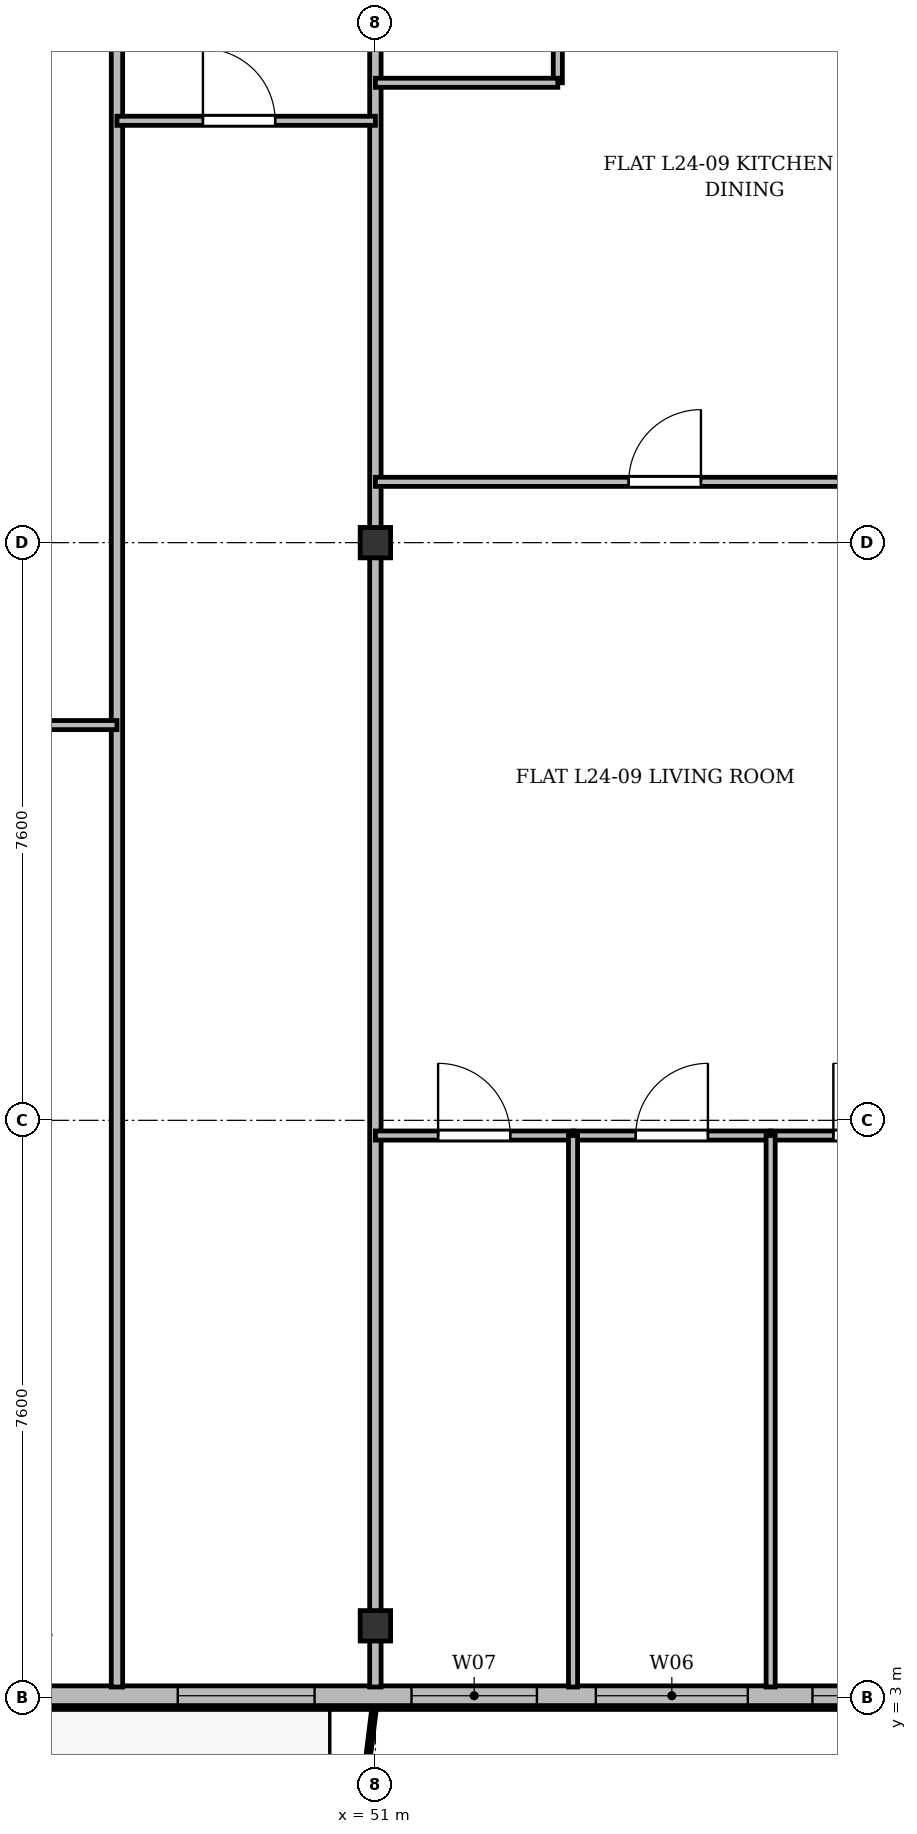
"""IFC4 building model, lengths in metres.
Left out: names, types, materials, properties, quantities, classifications, styles, units other than length and angle.
Written with IfcOpenShell. Run it as: python <this file> out.ifc"""

import sys

from ifc_helpers import new_model, si_unit, direction, frame, frame_2d, origin, origin_2d, place, context, subcontext, project, spatial, rectangle, i_section, extrude, source, transform, mapped, element, fill, save


model = new_model("IFC4")
c1 = context("Model", 3, precision=1e-05, world=origin(), true_north=direction((0.0, 1.0)))
c2 = subcontext(c1, "Body", "Model", "MODEL_VIEW")
j1 = project(units=[si_unit("LENGTHUNIT", "METRE"), si_unit("PLANEANGLEUNIT", "RADIAN")], contexts=[c1])
p1 = place(None, origin())
s1 = spatial("IfcSite", under=j1, at=p1, CompositionType="ELEMENT")
p2 = place(p1, origin())
s2 = spatial("IfcBuilding", under=s1, at=p2, CompositionType="ELEMENT")
p3 = place(p2, frame((0.0, 0.0, 96.1)))
s3 = spatial("IfcBuildingStorey", under=s2, at=p3, CompositionType="ELEMENT", Elevation=96.1)
m1 = source(origin(), c2, "Body", "SweptSolid", [
    extrude(i_section(OverallWidth=0.4, OverallDepth=0.4, WebThickness=0.022, FlangeThickness=0.035, at=origin_2d()), origin(), (0.0, 0.0, 1.0), 3.6),
])
for number, where, z_axis, x_axis in (
    (1, (51.0, 3.95, 0.0), (0.0, 0.0, 1.0), (1.0, 0.0, 0.0)),
    (2, (51.0, 18.2, 0.0), (0.0, 0.0, 1.0), (1.0, 0.0, 0.0)),
):
    element("IfcColumn", number, at=place(p3, frame(where, z_axis=z_axis, x_axis=x_axis)), inside=s3, PredefinedType="COLUMN", context=c2, shape_type="MappedRepresentation", body=[
        mapped(m1, transform((0.0, 0.0, 0.0), x_axis=(1.0, 0.0, 0.0), y_axis=(0.0, 1.0, 0.0), z_axis=(0.0, 0.0, 1.0), scale=1.0)),
    ])
p4 = place(p3, frame((66.9, 3.03, 0.0), z_axis=(0.0, 0.0, 1.0), x_axis=(-1.0, 0.0, 0.0)))
e3 = element("IfcWall", 3, at=p4, inside=s3, PredefinedType="SOLIDWALL", context=c2, shape_type="SweptSolid", body=[
    extrude(rectangle(XDim=59.4, YDim=0.26, at=frame_2d((29.7, 0.0))), origin(), (0.0, 0.0, 1.0), 3.34),
])
p5 = place(p4, frame((2.1, 0.0, 0.9)))
e4 = element("IfcOpeningElement", 4, at=p5, cuts=e3, PredefinedType="OPENING", context=c2, shape_type="SweptSolid", body=[
    extrude(rectangle(XDim=1.8, YDim=1.8, at=frame_2d((0.9, 0.9))), frame((0.0, 0.14, 0.0), z_axis=(0.0, -1.0, 0.0), x_axis=(1.0, 0.0, 0.0)), (0.0, 0.0, 1.0), 0.28),
])
p6 = place(p4, frame((5.3, 0.0, 0.9)))
e5 = element("IfcOpeningElement", 5, at=p6, cuts=e3, PredefinedType="OPENING", context=c2, shape_type="SweptSolid", body=[
    extrude(rectangle(XDim=2.2, YDim=1.8, at=frame_2d((1.1, 0.9))), frame((0.0, 0.14, 0.0), z_axis=(0.0, -1.0, 0.0), x_axis=(1.0, 0.0, 0.0)), (0.0, 0.0, 1.0), 0.28),
])
p7 = place(p4, frame((8.65, 0.0, 0.9)))
e6 = element("IfcOpeningElement", 6, at=p7, cuts=e3, PredefinedType="OPENING", context=c2, shape_type="SweptSolid", body=[
    extrude(rectangle(XDim=1.5, YDim=1.75, at=frame_2d((0.75, 0.875))), frame((0.0, 0.14, 0.0), z_axis=(0.0, -1.0, 0.0), x_axis=(1.0, 0.0, 0.0)), (0.0, 0.0, 1.0), 0.28),
])
p8 = place(p4, frame((11.0, 0.0, 0.9)))
e7 = element("IfcOpeningElement", 7, at=p8, cuts=e3, PredefinedType="OPENING", context=c2, shape_type="SweptSolid", body=[
    extrude(rectangle(XDim=2.0, YDim=1.95, at=frame_2d((1.0, 0.975))), frame((0.0, 0.14, 0.0), z_axis=(0.0, -1.0, 0.0), x_axis=(1.0, 0.0, 0.0)), (0.0, 0.0, 1.0), 0.28),
])
p9 = place(p4, frame((13.775, 0.0, 0.9)))
e8 = element("IfcOpeningElement", 8, at=p9, cuts=e3, PredefinedType="OPENING", context=c2, shape_type="SweptSolid", body=[
    extrude(rectangle(XDim=1.65, YDim=1.85, at=frame_2d((0.825, 0.925))), frame((0.0, 0.14, 0.0), z_axis=(0.0, -1.0, 0.0), x_axis=(1.0, 0.0, 0.0)), (0.0, 0.0, 1.0), 0.28),
])
p10 = place(p4, frame((16.7, 0.0, 0.9)))
e9 = element("IfcOpeningElement", 9, at=p10, cuts=e3, PredefinedType="OPENING", context=c2, shape_type="SweptSolid", body=[
    extrude(rectangle(XDim=1.8, YDim=1.8, at=frame_2d((0.9, 0.9))), frame((0.0, 0.14, 0.0), z_axis=(0.0, -1.0, 0.0), x_axis=(1.0, 0.0, 0.0)), (0.0, 0.0, 1.0), 0.28),
])
p11 = place(p4, frame((20.227, 0.0, 0.0)))
e10 = element("IfcOpeningElement", 10, at=p11, cuts=e3, PredefinedType="OPENING", context=c2, shape_type="SweptSolid", body=[
    extrude(rectangle(XDim=1.2, YDim=2.2, at=frame_2d((0.6, 1.1))), frame((0.0, 0.14, 0.0), z_axis=(0.0, -1.0, 0.0), x_axis=(1.0, 0.0, 0.0)), (0.0, 0.0, 1.0), 0.28),
])
p12 = place(p4, frame((28.95, 0.0, 0.9)))
e11 = element("IfcOpeningElement", 11, at=p12, cuts=e3, PredefinedType="OPENING", context=c2, shape_type="SweptSolid", body=[
    extrude(rectangle(XDim=1.5, YDim=1.75, at=frame_2d((0.75, 0.875))), frame((0.0, 0.14, 0.0), z_axis=(0.0, -1.0, 0.0), x_axis=(1.0, 0.0, 0.0)), (0.0, 0.0, 1.0), 0.28),
])
p13 = place(p4, frame((36.5, 0.0, 0.9)))
e12 = element("IfcOpeningElement", 12, at=p13, cuts=e3, PredefinedType="OPENING", context=c2, shape_type="SweptSolid", body=[
    extrude(rectangle(XDim=2.0, YDim=1.95, at=frame_2d((1.0, 0.975))), frame((0.0, 0.14, 0.0), z_axis=(0.0, -1.0, 0.0), x_axis=(1.0, 0.0, 0.0)), (0.0, 0.0, 1.0), 0.28),
])
p14 = place(p4, frame((39.075, 0.0, 0.9)))
e13 = element("IfcOpeningElement", 13, at=p14, cuts=e3, PredefinedType="OPENING", context=c2, shape_type="SweptSolid", body=[
    extrude(rectangle(XDim=1.65, YDim=1.85, at=frame_2d((0.825, 0.925))), frame((0.0, 0.14, 0.0), z_axis=(0.0, -1.0, 0.0), x_axis=(1.0, 0.0, 0.0)), (0.0, 0.0, 1.0), 0.28),
])
p15 = place(p4, frame((41.4, 0.0, 0.9)))
e14 = element("IfcOpeningElement", 14, at=p15, cuts=e3, PredefinedType="OPENING", context=c2, shape_type="SweptSolid", body=[
    extrude(rectangle(XDim=1.8, YDim=1.8, at=frame_2d((0.9, 0.9))), frame((0.0, 0.14, 0.0), z_axis=(0.0, -1.0, 0.0), x_axis=(1.0, 0.0, 0.0)), (0.0, 0.0, 1.0), 0.28),
])
p16 = place(p4, frame((45.36, 0.0, 0.0)))
e15 = element("IfcOpeningElement", 15, at=p16, cuts=e3, PredefinedType="OPENING", context=c2, shape_type="SweptSolid", body=[
    extrude(rectangle(XDim=1.2, YDim=2.2, at=frame_2d((0.6, 1.1))), frame((0.0, 0.14, 0.0), z_axis=(0.0, -1.0, 0.0), x_axis=(1.0, 0.0, 0.0)), (0.0, 0.0, 1.0), 0.28),
])
p17 = place(p4, frame((48.55, 0.0, 0.9)))
e16 = element("IfcOpeningElement", 16, at=p17, cuts=e3, PredefinedType="OPENING", context=c2, shape_type="SweptSolid", body=[
    extrude(rectangle(XDim=1.5, YDim=1.75, at=frame_2d((0.75, 0.875))), frame((0.0, 0.14, 0.0), z_axis=(0.0, -1.0, 0.0), x_axis=(1.0, 0.0, 0.0)), (0.0, 0.0, 1.0), 0.28),
])
p18 = place(p4, frame((52.0, 0.0, 0.9)))
e17 = element("IfcOpeningElement", 17, at=p18, cuts=e3, PredefinedType="OPENING", context=c2, shape_type="SweptSolid", body=[
    extrude(rectangle(XDim=2.0, YDim=1.95, at=frame_2d((1.0, 0.975))), frame((0.0, 0.14, 0.0), z_axis=(0.0, -1.0, 0.0), x_axis=(1.0, 0.0, 0.0)), (0.0, 0.0, 1.0), 0.28),
])
p19 = place(p4, frame((55.575, 0.0, 0.9)))
e18 = element("IfcOpeningElement", 18, at=p19, cuts=e3, PredefinedType="OPENING", context=c2, shape_type="SweptSolid", body=[
    extrude(rectangle(XDim=1.65, YDim=1.85, at=frame_2d((0.825, 0.925))), frame((0.0, 0.14, 0.0), z_axis=(0.0, -1.0, 0.0), x_axis=(1.0, 0.0, 0.0)), (0.0, 0.0, 1.0), 0.28),
])
p20 = place(p3, frame((47.6, 3.145, 0.0), z_axis=(0.0, 0.0, 1.0), x_axis=(0.0, 1.0, 0.0)))
e19 = element("IfcWall", 19, at=p20, inside=s3, PredefinedType="PARTITIONING", context=c2, shape_type="SweptSolid", body=[
    extrude(rectangle(XDim=24.455, YDim=0.15, at=frame_2d((12.228, 0.0))), origin(), (0.0, 0.0, 1.0), 2.752),
])
p21 = place(p3, frame((51.0, 3.145, 0.0), z_axis=(0.0, 0.0, 1.0), x_axis=(0.0, 1.0, 0.0)))
e20 = element("IfcWall", 20, at=p21, inside=s3, PredefinedType="PARTITIONING", context=c2, shape_type="SweptSolid", body=[
    extrude(rectangle(XDim=24.455, YDim=0.15, at=frame_2d((12.228, 0.0))), origin(), (0.0, 0.0, 1.0), 2.84),
])
p22 = place(p3, frame((43.8, 15.8, 0.0), z_axis=(0.0, 0.0, 1.0), x_axis=(1.0, 0.0, 0.0)))
e21 = element("IfcWall", 21, at=p22, inside=s3, PredefinedType="PARTITIONING", context=c2, shape_type="SweptSolid", body=[
    extrude(rectangle(XDim=3.8, YDim=0.12, at=frame_2d((1.9, 0.0))), origin(), (0.0, 0.0, 1.0), 2.84),
])
p23 = place(p22, frame((1.33, 0.0, 0.0)))
e22 = element("IfcOpeningElement", 22, at=p23, cuts=e21, PredefinedType="OPENING", context=c2, shape_type="SweptSolid", body=[
    extrude(rectangle(XDim=0.95, YDim=2.15, at=frame_2d((0.475, 1.075))), frame((0.0, 0.07, 0.0), z_axis=(0.0, -1.0, 0.0), x_axis=(1.0, 0.0, 0.0)), (0.0, 0.0, 1.0), 0.14),
])
p24 = place(p3, frame((47.6, 23.75, 0.0), z_axis=(0.0, 0.0, 1.0), x_axis=(1.0, 0.0, 0.0)))
e23 = element("IfcWall", 23, at=p24, inside=s3, PredefinedType="PARTITIONING", context=c2, shape_type="SweptSolid", body=[
    extrude(rectangle(XDim=3.4, YDim=0.12, at=frame_2d((1.7, 0.0))), origin(), (0.0, 0.0, 1.0), 2.84),
])
p25 = place(p24, frame((1.131, 0.0, 0.0)))
e24 = element("IfcOpeningElement", 24, at=p25, cuts=e23, PredefinedType="OPENING", context=c2, shape_type="SweptSolid", body=[
    extrude(rectangle(XDim=0.95, YDim=2.15, at=frame_2d((0.475, 1.075))), frame((0.0, 0.07, 0.0), z_axis=(0.0, -1.0, 0.0), x_axis=(1.0, 0.0, 0.0)), (0.0, 0.0, 1.0), 0.14),
])
p26 = place(p3, frame((51.0, 19.0, 0.0), z_axis=(0.0, 0.0, 1.0), x_axis=(1.0, 0.0, 0.0)))
e25 = element("IfcWall", 25, at=p26, inside=s3, PredefinedType="PARTITIONING", context=c2, shape_type="SweptSolid", body=[
    extrude(rectangle(XDim=7.8, YDim=0.12, at=frame_2d((3.9, 0.0))), origin(), (0.0, 0.0, 1.0), 2.84),
])
p27 = place(p26, frame((3.333, 0.0, 0.0)))
e26 = element("IfcOpeningElement", 26, at=p27, cuts=e25, PredefinedType="OPENING", context=c2, shape_type="SweptSolid", body=[
    extrude(rectangle(XDim=0.95, YDim=2.15, at=frame_2d((0.475, 1.075))), frame((0.0, 0.07, 0.0), z_axis=(0.0, -1.0, 0.0), x_axis=(1.0, 0.0, 0.0)), (0.0, 0.0, 1.0), 0.14),
])
p28 = place(p3, frame((53.4, 24.25, 0.0), z_axis=(0.0, 0.0, 1.0), x_axis=(0.0, 1.0, 0.0)))
e27 = element("IfcWall", 27, at=p28, inside=s3, PredefinedType="PARTITIONING", context=c2, shape_type="SweptSolid", body=[
    extrude(rectangle(XDim=3.35, YDim=0.12, at=frame_2d((1.675, 0.0))), origin(), (0.0, 0.0, 1.0), 2.99),
])
p29 = place(p28, frame((0.8, 0.0, 0.0)))
e28 = element("IfcOpeningElement", 28, at=p29, cuts=e27, PredefinedType="OPENING", context=c2, shape_type="SweptSolid", body=[
    extrude(rectangle(XDim=0.85, YDim=2.1, at=frame_2d((0.425, 1.05))), frame((0.0, 0.07, 0.0), z_axis=(0.0, -1.0, 0.0), x_axis=(1.0, 0.0, 0.0)), (0.0, 0.0, 1.0), 0.14),
])
p30 = place(p3, frame((51.0, 24.25, 0.0), z_axis=(0.0, 0.0, 1.0), x_axis=(1.0, 0.0, 0.0)))
e29 = element("IfcWall", 29, at=p30, inside=s3, PredefinedType="PARTITIONING", context=c2, shape_type="SweptSolid", body=[
    extrude(rectangle(XDim=2.4, YDim=0.12, at=frame_2d((1.2, 0.0))), origin(), (0.0, 0.0, 1.0), 2.84),
])
p31 = place(p3, frame((51.0, 10.4, 0.0), z_axis=(0.0, 0.0, 1.0), x_axis=(1.0, 0.0, 0.0)))
e30 = element("IfcWall", 30, at=p31, inside=s3, PredefinedType="PARTITIONING", context=c2, shape_type="SweptSolid", body=[
    extrude(rectangle(XDim=2.6, YDim=0.12, at=frame_2d((1.3, 0.0))), origin(), (0.0, 0.0, 1.0), 2.84),
])
p32 = place(p31, frame((0.825, 0.0, 0.0)))
e31 = element("IfcOpeningElement", 31, at=p32, cuts=e30, PredefinedType="OPENING", context=c2, shape_type="SweptSolid", body=[
    extrude(rectangle(XDim=0.95, YDim=2.15, at=frame_2d((0.475, 1.075))), frame((0.0, 0.07, 0.0), z_axis=(0.0, -1.0, 0.0), x_axis=(1.0, 0.0, 0.0)), (0.0, 0.0, 1.0), 0.14),
])
p33 = place(p3, frame((53.6, 10.4, 0.0), z_axis=(0.0, 0.0, 1.0), x_axis=(1.0, 0.0, 0.0)))
e32 = element("IfcWall", 32, at=p33, inside=s3, PredefinedType="PARTITIONING", context=c2, shape_type="SweptSolid", body=[
    extrude(rectangle(XDim=2.6, YDim=0.12, at=frame_2d((1.3, 0.0))), origin(), (0.0, 0.0, 1.0), 3.34),
])
p34 = place(p33, frame((0.825, 0.0, 0.0)))
e33 = element("IfcOpeningElement", 33, at=p34, cuts=e32, PredefinedType="OPENING", context=c2, shape_type="SweptSolid", body=[
    extrude(rectangle(XDim=0.95, YDim=2.15, at=frame_2d((0.475, 1.075))), frame((0.0, 0.07, 0.0), z_axis=(0.0, -1.0, 0.0), x_axis=(1.0, 0.0, 0.0)), (0.0, 0.0, 1.0), 0.14),
])
p35 = place(p3, frame((53.6, 3.145, 0.0), z_axis=(0.0, 0.0, 1.0), x_axis=(0.0, 1.0, 0.0)))
e34 = element("IfcWall", 34, at=p35, inside=s3, PredefinedType="PARTITIONING", context=c2, shape_type="SweptSolid", body=[
    extrude(rectangle(XDim=7.255, YDim=0.12, at=frame_2d((3.627, 0.0))), origin(), (0.0, 0.0, 1.0), 2.752),
])
p36 = place(p3, frame((56.2, 10.4, 0.0), z_axis=(0.0, 0.0, 1.0), x_axis=(1.0, 0.0, 0.0)))
e35 = element("IfcWall", 35, at=p36, inside=s3, PredefinedType="PARTITIONING", context=c2, shape_type="SweptSolid", body=[
    extrude(rectangle(XDim=2.6, YDim=0.12, at=frame_2d((1.3, 0.0))), origin(), (0.0, 0.0, 1.0), 2.84),
])
p37 = place(p36, frame((0.825, 0.0, 0.0)))
e36 = element("IfcOpeningElement", 36, at=p37, cuts=e35, PredefinedType="OPENING", context=c2, shape_type="SweptSolid", body=[
    extrude(rectangle(XDim=0.95, YDim=2.15, at=frame_2d((0.475, 1.075))), frame((0.0, 0.07, 0.0), z_axis=(0.0, -1.0, 0.0), x_axis=(1.0, 0.0, 0.0)), (0.0, 0.0, 1.0), 0.14),
])
p38 = place(p3, frame((56.2, 3.145, 0.0), z_axis=(0.0, 0.0, 1.0), x_axis=(0.0, 1.0, 0.0)))
e37 = element("IfcWall", 37, at=p38, inside=s3, PredefinedType="PARTITIONING", context=c2, shape_type="SweptSolid", body=[
    extrude(rectangle(XDim=7.255, YDim=0.12, at=frame_2d((3.627, 0.0))), origin(), (0.0, 0.0, 1.0), 2.752),
])
m2 = source(origin(), c2, "Body", "SweptSolid", [
    extrude(rectangle(XDim=1.5, YDim=1.75, at=frame_2d((0.75, 0.875))), frame((0.0, 0.03, 0.0), z_axis=(0.0, -1.0, 0.0), x_axis=(1.0, 0.0, 0.0)), (0.0, 0.0, 1.0), 0.06),
])
p39 = place(p7, origin())
e38 = element("IfcWindow", 38, at=p39, inside=s3, PartitioningType="SINGLE_PANEL", PredefinedType="WINDOW", context=c2, shape_type="MappedRepresentation", body=[
    mapped(m2, transform((0.0, 0.0, 0.0), x_axis=(1.0, 0.0, 0.0), y_axis=(0.0, 1.0, 0.0), z_axis=(0.0, 0.0, 1.0), scale=1.0)),
])
fill(e6, e38)
m3 = source(origin(), c2, "Body", "SweptSolid", [
    extrude(rectangle(XDim=2.0, YDim=1.95, at=frame_2d((1.0, 0.975))), frame((0.0, 0.03, 0.0), z_axis=(0.0, -1.0, 0.0), x_axis=(1.0, 0.0, 0.0)), (0.0, 0.0, 1.0), 0.06),
])
p40 = place(p8, origin())
e39 = element("IfcWindow", 39, at=p40, inside=s3, PartitioningType="SINGLE_PANEL", PredefinedType="WINDOW", context=c2, shape_type="MappedRepresentation", body=[
    mapped(m3, transform((0.0, 0.0, 0.0), x_axis=(1.0, 0.0, 0.0), y_axis=(0.0, 1.0, 0.0), z_axis=(0.0, 0.0, 1.0), scale=1.0)),
])
fill(e7, e39)
m4 = source(origin(), c2, "Body", "SweptSolid", [
    extrude(rectangle(XDim=1.65, YDim=1.85, at=frame_2d((0.825, 0.925))), frame((0.0, 0.03, 0.0), z_axis=(0.0, -1.0, 0.0), x_axis=(1.0, 0.0, 0.0)), (0.0, 0.0, 1.0), 0.06),
])
p41 = place(p9, origin())
e40 = element("IfcWindow", 40, at=p41, inside=s3, PartitioningType="SINGLE_PANEL", PredefinedType="WINDOW", context=c2, shape_type="MappedRepresentation", body=[
    mapped(m4, transform((0.0, 0.0, 0.0), x_axis=(1.0, 0.0, 0.0), y_axis=(0.0, 1.0, 0.0), z_axis=(0.0, 0.0, 1.0), scale=1.0)),
])
fill(e8, e40)
m5 = source(origin(), c2, "Body", "SweptSolid", [
    extrude(rectangle(XDim=1.8, YDim=1.8, at=frame_2d((0.9, 0.9))), frame((0.0, 0.03, 0.0), z_axis=(0.0, -1.0, 0.0), x_axis=(1.0, 0.0, 0.0)), (0.0, 0.0, 1.0), 0.06),
])
p42 = place(p10, origin())
e41 = element("IfcWindow", 41, at=p42, inside=s3, PartitioningType="SINGLE_PANEL", PredefinedType="WINDOW", context=c2, shape_type="MappedRepresentation", body=[
    mapped(m5, transform((0.0, 0.0, 0.0), x_axis=(1.0, 0.0, 0.0), y_axis=(0.0, 1.0, 0.0), z_axis=(0.0, 0.0, 1.0), scale=1.0)),
])
fill(e9, e41)
m6 = source(origin(), c2, "Body", "SweptSolid", [
    extrude(rectangle(XDim=0.95, YDim=2.15, at=frame_2d((0.475, 1.075))), frame((0.0, 0.025, 0.0), z_axis=(0.0, -1.0, 0.0), x_axis=(1.0, 0.0, 0.0)), (0.0, 0.0, 1.0), 0.05),
])
p43 = place(p25, origin())
e42 = element("IfcDoor", 42, at=p43, inside=s3, OperationType="SINGLE_SWING_LEFT", PredefinedType="DOOR", context=c2, shape_type="MappedRepresentation", body=[
    mapped(m6, transform((0.0, 0.0, 0.0), x_axis=(1.0, 0.0, 0.0), y_axis=(0.0, 1.0, 0.0), z_axis=(0.0, 0.0, 1.0), scale=1.0)),
])
fill(e24, e42)
p44 = place(p27, origin())
e43 = element("IfcDoor", 43, at=p44, inside=s3, OperationType="SINGLE_SWING_RIGHT", PredefinedType="DOOR", context=c2, shape_type="MappedRepresentation", body=[
    mapped(m6, transform((0.0, 0.0, 0.0), x_axis=(1.0, 0.0, 0.0), y_axis=(0.0, 1.0, 0.0), z_axis=(0.0, 0.0, 1.0), scale=1.0)),
])
fill(e26, e43)
p45 = place(p32, origin())
e44 = element("IfcDoor", 44, at=p45, inside=s3, OperationType="SINGLE_SWING_LEFT", PredefinedType="DOOR", context=c2, shape_type="MappedRepresentation", body=[
    mapped(m6, transform((0.0, 0.0, 0.0), x_axis=(1.0, 0.0, 0.0), y_axis=(0.0, 1.0, 0.0), z_axis=(0.0, 0.0, 1.0), scale=1.0)),
])
fill(e31, e44)
p46 = place(p34, origin())
e45 = element("IfcDoor", 45, at=p46, inside=s3, OperationType="SINGLE_SWING_RIGHT", PredefinedType="DOOR", context=c2, shape_type="MappedRepresentation", body=[
    mapped(m6, transform((0.0, 0.0, 0.0), x_axis=(1.0, 0.0, 0.0), y_axis=(0.0, 1.0, 0.0), z_axis=(0.0, 0.0, 1.0), scale=1.0)),
])
fill(e33, e45)
p47 = place(p37, origin())
e46 = element("IfcDoor", 46, at=p47, inside=s3, OperationType="SINGLE_SWING_LEFT", PredefinedType="DOOR", context=c2, shape_type="MappedRepresentation", body=[
    mapped(m6, transform((0.0, 0.0, 0.0), x_axis=(1.0, 0.0, 0.0), y_axis=(0.0, 1.0, 0.0), z_axis=(0.0, 0.0, 1.0), scale=1.0)),
])
fill(e36, e46)
save(model, sys.argv[1])
